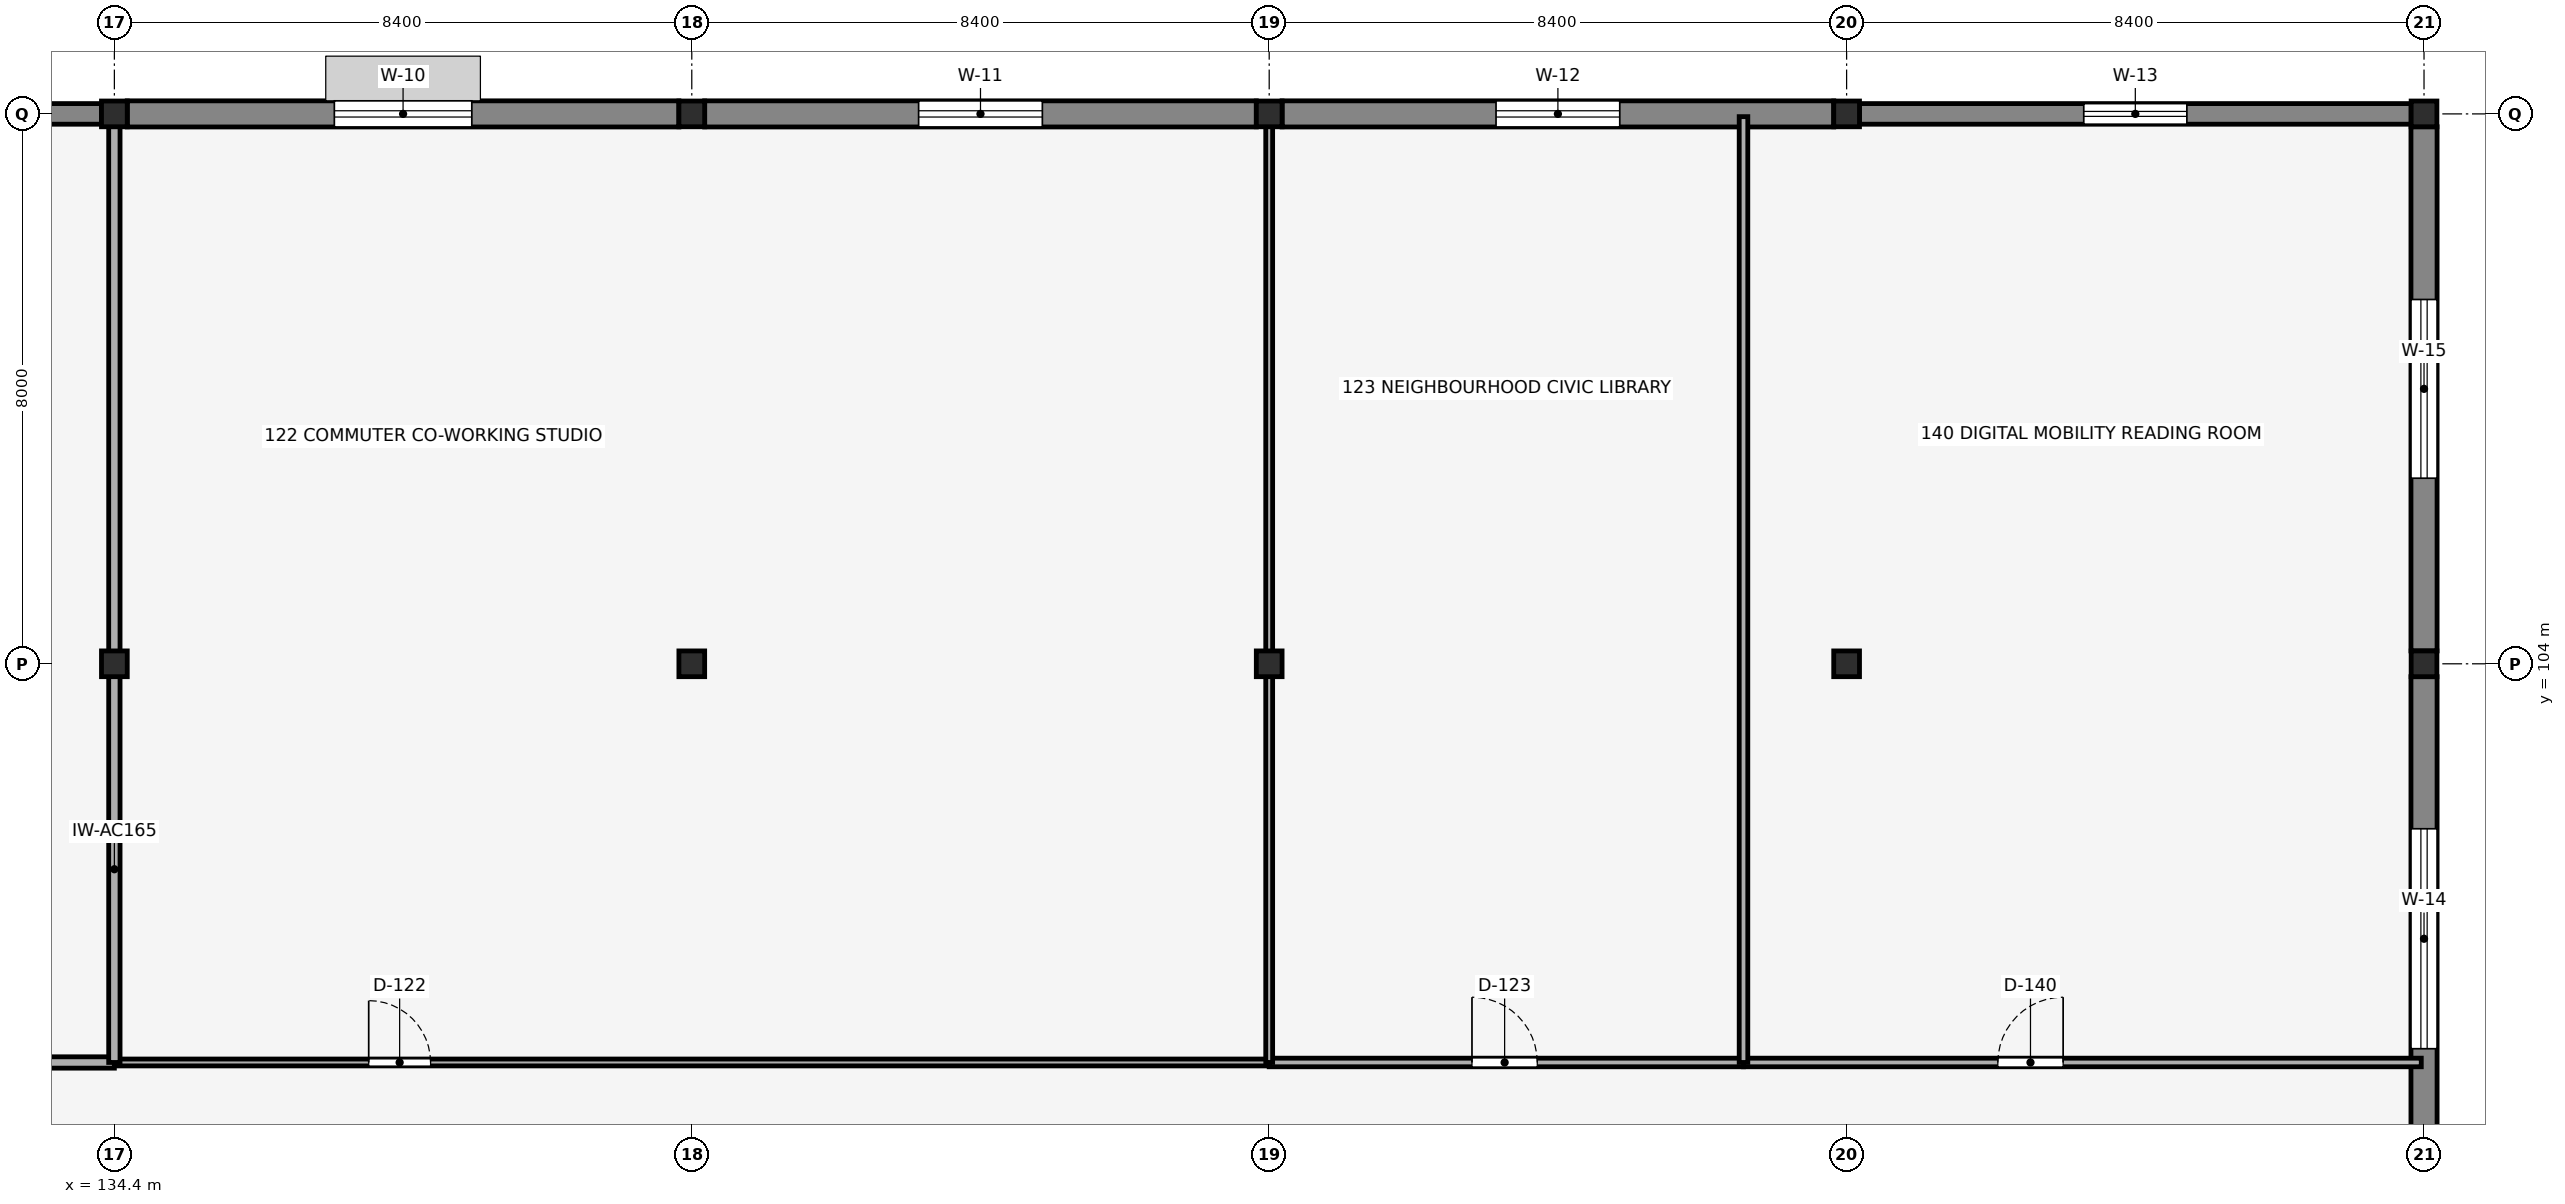
"""IFC4 building model, lengths in metres.
Left out: names, types, materials, properties, quantities, classifications, styles, units other than length and angle.
Written with IfcOpenShell. Run it as: python <this file> out.ifc"""

import sys

from ifc_helpers import new_model, si_unit, direction, frame, frame_2d, origin, origin_2d, place, context, subcontext, project, spatial, rectangle, i_section, extrude, element, fill, save


model = new_model("IFC4")
c1 = context("Model", 3, precision=1e-05, world=origin(), true_north=direction((0.0, 1.0)))
c2 = subcontext(c1, "Body", "Model", "MODEL_VIEW")
j1 = project(units=[si_unit("LENGTHUNIT", "METRE"), si_unit("PLANEANGLEUNIT", "RADIAN")], contexts=[c1])
p1 = place(None, origin())
s1 = spatial("IfcSite", under=j1, at=p1, CompositionType="ELEMENT")
p2 = place(p1, origin())
s2 = spatial("IfcBuilding", under=s1, at=p2, CompositionType="ELEMENT")
p3 = place(p2, frame((0.0, 0.0, 5.44)))
s3 = spatial("IfcBuildingStorey", under=s2, at=p3, CompositionType="ELEMENT", Elevation=5.44)
for number, where, z_axis, x_axis in (
    (1, (134.4, 104.0, 0.0), (0.0, 0.0, 1.0), (1.0, 0.0, 0.0)),
    (2, (134.4, 112.0, 0.0), (0.0, 0.0, 1.0), (1.0, 0.0, 0.0)),
    (3, (142.8, 104.0, 0.0), (0.0, 0.0, 1.0), (1.0, 0.0, 0.0)),
    (4, (142.8, 112.0, 0.0), (0.0, 0.0, 1.0), (1.0, 0.0, 0.0)),
    (5, (151.2, 104.0, 0.0), (0.0, 0.0, 1.0), (1.0, 0.0, 0.0)),
    (6, (151.2, 112.0, 0.0), (0.0, 0.0, 1.0), (1.0, 0.0, 0.0)),
    (7, (159.6, 104.0, 0.0), (0.0, 0.0, 1.0), (1.0, 0.0, 0.0)),
    (8, (159.6, 112.0, 0.0), (0.0, 0.0, 1.0), (1.0, 0.0, 0.0)),
    (9, (168.0, 104.0, 0.0), (0.0, 0.0, 1.0), (1.0, 0.0, 0.0)),
    (10, (168.0, 112.0, 0.0), (0.0, 0.0, 1.0), (1.0, 0.0, 0.0)),
):
    element("IfcColumn", number, at=place(p3, frame(where, z_axis=z_axis, x_axis=x_axis)), inside=s3, PredefinedType="COLUMN", context=c2, shape_type="SweptSolid", body=[
        extrude(i_section(OverallWidth=0.375, OverallDepth=0.375, WebThickness=0.017, FlangeThickness=0.027, FilletRadius=0.015, at=origin_2d()), origin(), (0.0, 0.0, 1.0), 3.8),
    ])
p4 = place(p3, frame((126.187, 112.0, 0.0), z_axis=(0.0, 0.0, 1.0), x_axis=(1.0, 0.0, 0.0)))
e11 = element("IfcWall", 11, at=p4, inside=s3, PredefinedType="SOLIDWALL", context=c2, shape_type="SweptSolid", body=[
    extrude(rectangle(XDim=8.025, YDim=0.3, at=frame_2d((4.013, 0.0))), origin(), (0.0, 0.0, 1.0), 3.45),
])
p5 = place(p4, frame((2.913, 0.0, 0.9), z_axis=(0.0, 0.0, 1.0), x_axis=(1.0, 0.0, 0.0)))
e12 = element("IfcOpeningElement", 12, at=p5, cuts=e11, PredefinedType="OPENING", context=c2, shape_type="SweptSolid", body=[
    extrude(rectangle(XDim=2.2, YDim=1.5, at=frame_2d((1.1, 0.75))), frame((0.0, 0.16, 0.0), z_axis=(0.0, -1.0, 0.0), x_axis=(1.0, 0.0, 0.0)), (0.0, 0.0, 1.0), 0.32),
])
p6 = place(p3, frame((134.587, 112.0, 0.0), z_axis=(0.0, 0.0, 1.0), x_axis=(1.0, 0.0, 0.0)))
e13 = element("IfcWall", 13, at=p6, inside=s3, PredefinedType="SOLIDWALL", context=c2, shape_type="SweptSolid", body=[
    extrude(rectangle(XDim=8.025, YDim=0.38, at=frame_2d((4.013, 0.0))), origin(), (0.0, 0.0, 1.0), 3.45),
])
p7 = place(p6, frame((3.013, 0.0, 0.9), z_axis=(0.0, 0.0, 1.0), x_axis=(1.0, 0.0, 0.0)))
e14 = element("IfcOpeningElement", 14, at=p7, cuts=e13, PredefinedType="OPENING", context=c2, shape_type="SweptSolid", body=[
    extrude(rectangle(XDim=2.0, YDim=1.5, at=frame_2d((1.0, 0.75))), frame((0.0, 0.2, 0.0), z_axis=(0.0, -1.0, 0.0), x_axis=(1.0, 0.0, 0.0)), (0.0, 0.0, 1.0), 0.4),
])
p8 = place(p3, frame((142.987, 112.0, 0.0), z_axis=(0.0, 0.0, 1.0), x_axis=(1.0, 0.0, 0.0)))
e15 = element("IfcWall", 15, at=p8, inside=s3, PredefinedType="SOLIDWALL", context=c2, shape_type="SweptSolid", body=[
    extrude(rectangle(XDim=8.025, YDim=0.38, at=frame_2d((4.013, 0.0))), origin(), (0.0, 0.0, 1.0), 3.45),
])
p9 = place(p8, frame((3.113, 0.0, 0.9), z_axis=(0.0, 0.0, 1.0), x_axis=(1.0, 0.0, 0.0)))
e16 = element("IfcOpeningElement", 16, at=p9, cuts=e15, PredefinedType="OPENING", context=c2, shape_type="SweptSolid", body=[
    extrude(rectangle(XDim=1.8, YDim=1.45, at=frame_2d((0.9, 0.725))), frame((0.0, 0.2, 0.0), z_axis=(0.0, -1.0, 0.0), x_axis=(1.0, 0.0, 0.0)), (0.0, 0.0, 1.0), 0.4),
])
p10 = place(p3, frame((151.387, 112.0, 0.0), z_axis=(0.0, 0.0, 1.0), x_axis=(1.0, 0.0, 0.0)))
e17 = element("IfcWall", 17, at=p10, inside=s3, PredefinedType="SOLIDWALL", context=c2, shape_type="SweptSolid", body=[
    extrude(rectangle(XDim=8.025, YDim=0.38, at=frame_2d((4.013, 0.0))), origin(), (0.0, 0.0, 1.0), 3.45),
])
p11 = place(p10, frame((3.113, 0.0, 0.9), z_axis=(0.0, 0.0, 1.0), x_axis=(1.0, 0.0, 0.0)))
e18 = element("IfcOpeningElement", 18, at=p11, cuts=e17, PredefinedType="OPENING", context=c2, shape_type="SweptSolid", body=[
    extrude(rectangle(XDim=1.8, YDim=1.3, at=frame_2d((0.9, 0.65))), frame((0.0, 0.2, 0.0), z_axis=(0.0, -1.0, 0.0), x_axis=(1.0, 0.0, 0.0)), (0.0, 0.0, 1.0), 0.4),
])
p12 = place(p3, frame((159.787, 112.0, 0.0), z_axis=(0.0, 0.0, 1.0), x_axis=(1.0, 0.0, 0.0)))
e19 = element("IfcWall", 19, at=p12, inside=s3, PredefinedType="SOLIDWALL", context=c2, shape_type="SweptSolid", body=[
    extrude(rectangle(XDim=8.025, YDim=0.3, at=frame_2d((4.013, 0.0))), origin(), (0.0, 0.0, 1.0), 3.45),
])
p13 = place(p12, frame((3.263, 0.0, 0.9), z_axis=(0.0, 0.0, 1.0), x_axis=(1.0, 0.0, 0.0)))
e20 = element("IfcOpeningElement", 20, at=p13, cuts=e19, PredefinedType="OPENING", context=c2, shape_type="SweptSolid", body=[
    extrude(rectangle(XDim=1.5, YDim=1.4, at=frame_2d((0.75, 0.7))), frame((0.0, 0.16, 0.0), z_axis=(0.0, -1.0, 0.0), x_axis=(1.0, 0.0, 0.0)), (0.0, 0.0, 1.0), 0.32),
])
p14 = place(p3, frame((168.0, 96.187, 0.0), z_axis=(0.0, 0.0, 1.0), x_axis=(0.0, 1.0, 0.0)))
e21 = element("IfcWall", 21, at=p14, inside=s3, PredefinedType="SOLIDWALL", context=c2, shape_type="SweptSolid", body=[
    extrude(rectangle(XDim=7.625, YDim=0.38, at=frame_2d((3.813, 0.0))), origin(), (0.0, 0.0, 1.0), 3.442),
])
p15 = place(p14, frame((2.213, 0.0, 1.55), z_axis=(0.0, 0.0, 1.0), x_axis=(1.0, 0.0, 0.0)))
e22 = element("IfcOpeningElement", 22, at=p15, cuts=e21, PredefinedType="OPENING", context=c2, shape_type="SweptSolid", body=[
    extrude(rectangle(XDim=3.2, YDim=0.9, at=frame_2d((1.6, 0.45))), frame((0.0, 0.2, 0.0), z_axis=(0.0, -1.0, 0.0), x_axis=(1.0, 0.0, 0.0)), (0.0, 0.0, 1.0), 0.4),
])
p16 = place(p3, frame((168.0, 104.187, 0.0), z_axis=(0.0, 0.0, 1.0), x_axis=(0.0, 1.0, 0.0)))
e23 = element("IfcWall", 23, at=p16, inside=s3, PredefinedType="SOLIDWALL", context=c2, shape_type="SweptSolid", body=[
    extrude(rectangle(XDim=7.625, YDim=0.38, at=frame_2d((3.813, 0.0))), origin(), (0.0, 0.0, 1.0), 3.442),
])
p17 = place(p16, frame((2.513, 0.0, 1.55), z_axis=(0.0, 0.0, 1.0), x_axis=(1.0, 0.0, 0.0)))
e24 = element("IfcOpeningElement", 24, at=p17, cuts=e23, PredefinedType="OPENING", context=c2, shape_type="SweptSolid", body=[
    extrude(rectangle(XDim=2.6, YDim=0.85, at=frame_2d((1.3, 0.425))), frame((0.0, 0.2, 0.0), z_axis=(0.0, -1.0, 0.0), x_axis=(1.0, 0.0, 0.0)), (0.0, 0.0, 1.0), 0.4),
])
p18 = place(p3, frame((109.2, 98.2, 0.0), z_axis=(0.0, 0.0, 1.0), x_axis=(1.0, 0.0, 0.0)))
e25 = element("IfcWall", 25, at=p18, inside=s3, PredefinedType="PARTITIONING", context=c2, shape_type="SweptSolid", body=[
    extrude(rectangle(XDim=25.2, YDim=0.165, at=frame_2d((12.6, 0.0))), origin(), (0.0, 0.0, 1.0), 3.8),
])
p19 = place(p18, frame((3.7, 0.0, 0.0), z_axis=(0.0, 0.0, 1.0), x_axis=(1.0, 0.0, 0.0)))
e26 = element("IfcOpeningElement", 26, at=p19, cuts=e25, PredefinedType="OPENING", context=c2, shape_type="SweptSolid", body=[
    extrude(rectangle(XDim=1.1, YDim=2.2, at=frame_2d((0.55, 1.1))), frame((0.0, 0.093, 0.0), z_axis=(0.0, -1.0, 0.0), x_axis=(1.0, 0.0, 0.0)), (0.0, 0.0, 1.0), 0.185),
])
p20 = place(p3, frame((134.4, 98.2, 0.0), z_axis=(0.0, 0.0, 1.0), x_axis=(1.0, 0.0, 0.0)))
e27 = element("IfcWall", 27, at=p20, inside=s3, PredefinedType="PARTITIONING", context=c2, shape_type="SweptSolid", body=[
    extrude(rectangle(XDim=16.8, YDim=0.1, at=frame_2d((8.4, 0.0))), origin(), (0.0, 0.0, 1.0), 3.337),
])
p21 = place(p20, frame((3.7, 0.0, 0.0), z_axis=(0.0, 0.0, 1.0), x_axis=(1.0, 0.0, 0.0)))
e28 = element("IfcOpeningElement", 28, at=p21, cuts=e27, PredefinedType="OPENING", context=c2, shape_type="SweptSolid", body=[
    extrude(rectangle(XDim=0.9, YDim=2.1, at=frame_2d((0.45, 1.05))), frame((0.0, 0.06, 0.0), z_axis=(0.0, -1.0, 0.0), x_axis=(1.0, 0.0, 0.0)), (0.0, 0.0, 1.0), 0.12),
])
p22 = place(p3, frame((151.2, 98.2, 0.0), z_axis=(0.0, 0.0, 1.0), x_axis=(1.0, 0.0, 0.0)))
e29 = element("IfcWall", 29, at=p22, inside=s3, PredefinedType="PARTITIONING", context=c2, shape_type="SweptSolid", body=[
    extrude(rectangle(XDim=6.9, YDim=0.125, at=frame_2d((3.45, 0.0))), origin(), (0.0, 0.0, 1.0), 3.8),
])
p23 = place(p22, frame((2.95, 0.0, 0.0), z_axis=(0.0, 0.0, 1.0), x_axis=(1.0, 0.0, 0.0)))
e30 = element("IfcOpeningElement", 30, at=p23, cuts=e29, PredefinedType="OPENING", context=c2, shape_type="SweptSolid", body=[
    extrude(rectangle(XDim=0.95, YDim=2.15, at=frame_2d((0.475, 1.075))), frame((0.0, 0.073, 0.0), z_axis=(0.0, -1.0, 0.0), x_axis=(1.0, 0.0, 0.0)), (0.0, 0.0, 1.0), 0.145),
])
p24 = place(p3, frame((158.1, 98.2, 0.0), z_axis=(0.0, 0.0, 1.0), x_axis=(1.0, 0.0, 0.0)))
e31 = element("IfcWall", 31, at=p24, inside=s3, PredefinedType="PARTITIONING", context=c2, shape_type="SweptSolid", body=[
    extrude(rectangle(XDim=9.86, YDim=0.125, at=frame_2d((4.93, 0.0))), origin(), (0.0, 0.0, 1.0), 3.337),
])
p25 = place(p24, frame((3.7, 0.0, 0.0), z_axis=(0.0, 0.0, 1.0), x_axis=(1.0, 0.0, 0.0)))
e32 = element("IfcOpeningElement", 32, at=p25, cuts=e31, PredefinedType="OPENING", context=c2, shape_type="SweptSolid", body=[
    extrude(rectangle(XDim=0.95, YDim=2.15, at=frame_2d((0.475, 1.075))), frame((0.0, 0.073, 0.0), z_axis=(0.0, -1.0, 0.0), x_axis=(1.0, 0.0, 0.0)), (0.0, 0.0, 1.0), 0.145),
])
p26 = place(p3, frame((134.4, 98.2, 0.0), z_axis=(0.0, 0.0, 1.0), x_axis=(0.0, 1.0, 0.0)))
e33 = element("IfcWall", 33, at=p26, inside=s3, PredefinedType="PARTITIONING", context=c2, shape_type="SweptSolid", body=[
    extrude(rectangle(XDim=5.623, YDim=0.165, at=frame_2d((2.812, 0.0))), origin(), (0.0, 0.0, 1.0), 3.337),
])
p27 = place(p3, frame((134.4, 104.177, 0.0), z_axis=(0.0, 0.0, 1.0), x_axis=(0.0, 1.0, 0.0)))
e34 = element("IfcWall", 34, at=p27, inside=s3, PredefinedType="PARTITIONING", context=c2, shape_type="SweptSolid", body=[
    extrude(rectangle(XDim=7.646, YDim=0.165, at=frame_2d((3.823, 0.0))), origin(), (0.0, 0.0, 1.0), 3.337),
])
p28 = place(p3, frame((151.2, 98.2, 0.0), z_axis=(0.0, 0.0, 1.0), x_axis=(0.0, 1.0, 0.0)))
e35 = element("IfcWall", 35, at=p28, inside=s3, PredefinedType="PARTITIONING", context=c2, shape_type="SweptSolid", body=[
    extrude(rectangle(XDim=5.623, YDim=0.1, at=frame_2d((2.812, 0.0))), origin(), (0.0, 0.0, 1.0), 3.337),
])
p29 = place(p3, frame((151.2, 104.177, 0.0), z_axis=(0.0, 0.0, 1.0), x_axis=(0.0, 1.0, 0.0)))
e36 = element("IfcWall", 36, at=p29, inside=s3, PredefinedType="PARTITIONING", context=c2, shape_type="SweptSolid", body=[
    extrude(rectangle(XDim=7.646, YDim=0.1, at=frame_2d((3.823, 0.0))), origin(), (0.0, 0.0, 1.0), 3.337),
])
p30 = place(p3, frame((158.1, 98.2, 0.0), z_axis=(0.0, 0.0, 1.0), x_axis=(0.0, 1.0, 0.0)))
e37 = element("IfcWall", 37, at=p30, inside=s3, PredefinedType="PARTITIONING", context=c2, shape_type="SweptSolid", body=[
    extrude(rectangle(XDim=13.76, YDim=0.125, at=frame_2d((6.88, 0.0))), origin(), (0.0, 0.0, 1.0), 3.8),
])
p31 = place(p7, origin())
e38 = element("IfcWindow", 38, at=p31, inside=s3, PartitioningType="DOUBLE_PANEL_VERTICAL", PredefinedType="WINDOW", context=c2, shape_type="SweptSolid", body=[
    extrude(rectangle(XDim=2.0, YDim=1.5, at=frame_2d((1.0, 0.75))), frame((0.0, 0.03, 0.0), z_axis=(0.0, -1.0, 0.0), x_axis=(1.0, 0.0, 0.0)), (0.0, 0.0, 1.0), 0.06),
])
fill(e14, e38)
p32 = place(p9, origin())
e39 = element("IfcWindow", 39, at=p32, inside=s3, PartitioningType="DOUBLE_PANEL_VERTICAL", PredefinedType="WINDOW", context=c2, shape_type="SweptSolid", body=[
    extrude(rectangle(XDim=1.8, YDim=1.45, at=frame_2d((0.9, 0.725))), frame((0.0, 0.03, 0.0), z_axis=(0.0, -1.0, 0.0), x_axis=(1.0, 0.0, 0.0)), (0.0, 0.0, 1.0), 0.06),
])
fill(e16, e39)
p33 = place(p11, origin())
e40 = element("IfcWindow", 40, at=p33, inside=s3, PartitioningType="DOUBLE_PANEL_VERTICAL", PredefinedType="WINDOW", context=c2, shape_type="SweptSolid", body=[
    extrude(rectangle(XDim=1.8, YDim=1.3, at=frame_2d((0.9, 0.65))), frame((0.0, 0.03, 0.0), z_axis=(0.0, -1.0, 0.0), x_axis=(1.0, 0.0, 0.0)), (0.0, 0.0, 1.0), 0.06),
])
fill(e18, e40)
p34 = place(p13, origin())
e41 = element("IfcWindow", 41, at=p34, inside=s3, PartitioningType="SINGLE_PANEL", PredefinedType="WINDOW", context=c2, shape_type="SweptSolid", body=[
    extrude(rectangle(XDim=1.5, YDim=1.4, at=frame_2d((0.75, 0.7))), frame((0.0, 0.03, 0.0), z_axis=(0.0, -1.0, 0.0), x_axis=(1.0, 0.0, 0.0)), (0.0, 0.0, 1.0), 0.06),
])
fill(e20, e41)
p35 = place(p15, origin())
e42 = element("IfcWindow", 42, at=p35, inside=s3, PartitioningType="TRIPLE_PANEL_HORIZONTAL", PredefinedType="WINDOW", context=c2, shape_type="SweptSolid", body=[
    extrude(rectangle(XDim=3.2, YDim=0.9, at=frame_2d((1.6, 0.45))), frame((0.0, 0.03, 0.0), z_axis=(0.0, -1.0, 0.0), x_axis=(1.0, 0.0, 0.0)), (0.0, 0.0, 1.0), 0.06),
])
fill(e22, e42)
p36 = place(p17, origin())
e43 = element("IfcWindow", 43, at=p36, inside=s3, PartitioningType="DOUBLE_PANEL_HORIZONTAL", PredefinedType="WINDOW", context=c2, shape_type="SweptSolid", body=[
    extrude(rectangle(XDim=2.6, YDim=0.85, at=frame_2d((1.3, 0.425))), frame((0.0, 0.03, 0.0), z_axis=(0.0, -1.0, 0.0), x_axis=(1.0, 0.0, 0.0)), (0.0, 0.0, 1.0), 0.06),
])
fill(e24, e43)
p37 = place(p21, origin())
e44 = element("IfcDoor", 44, at=p37, inside=s3, OperationType="SINGLE_SWING_LEFT", PredefinedType="DOOR", context=c2, shape_type="SweptSolid", body=[
    extrude(rectangle(XDim=0.9, YDim=2.1, at=frame_2d((0.45, 1.05))), frame((0.0, 0.025, 0.0), z_axis=(0.0, -1.0, 0.0), x_axis=(1.0, 0.0, 0.0)), (0.0, 0.0, 1.0), 0.05),
])
fill(e28, e44)
p38 = place(p23, origin())
e45 = element("IfcDoor", 45, at=p38, inside=s3, OperationType="SINGLE_SWING_LEFT", PredefinedType="DOOR", context=c2, shape_type="SweptSolid", body=[
    extrude(rectangle(XDim=0.95, YDim=2.15, at=frame_2d((0.475, 1.075))), frame((0.0, 0.025, 0.0), z_axis=(0.0, -1.0, 0.0), x_axis=(1.0, 0.0, 0.0)), (0.0, 0.0, 1.0), 0.05),
])
fill(e30, e45)
p39 = place(p25, origin())
e46 = element("IfcDoor", 46, at=p39, inside=s3, OperationType="SINGLE_SWING_RIGHT", PredefinedType="DOOR", context=c2, shape_type="SweptSolid", body=[
    extrude(rectangle(XDim=0.95, YDim=2.15, at=frame_2d((0.475, 1.075))), frame((0.0, 0.025, 0.0), z_axis=(0.0, -1.0, 0.0), x_axis=(1.0, 0.0, 0.0)), (0.0, 0.0, 1.0), 0.05),
])
fill(e32, e46)
save(model, sys.argv[1])
